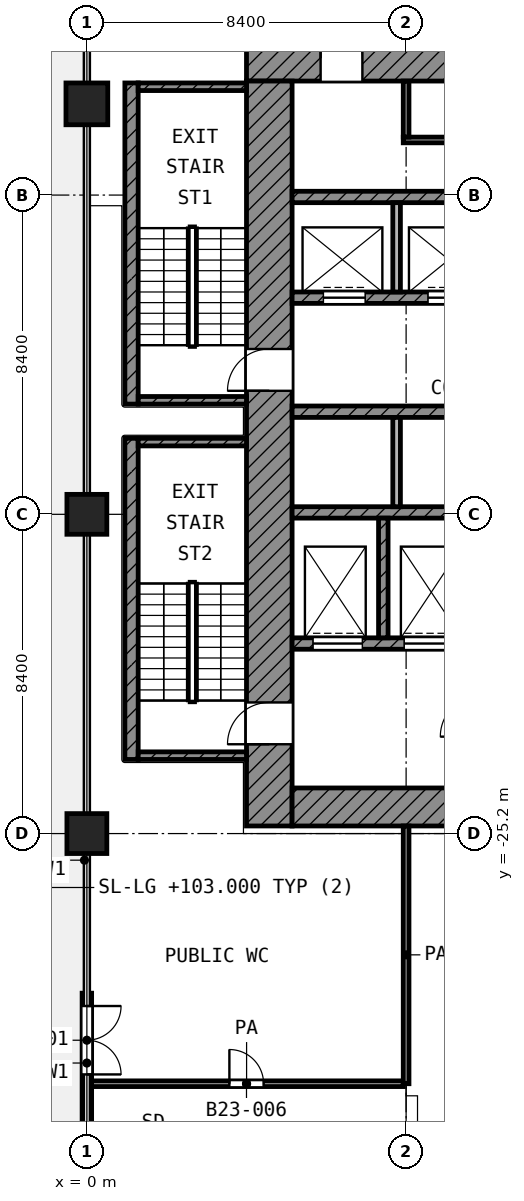
"""IFC4 building model, lengths in metres.
Left out: names, types, materials, properties, quantities, classifications, styles, units other than length and angle.
Written with IfcOpenShell. Run it as: python <this file> out.ifc"""

import sys

from ifc_helpers import new_model, si_unit, direction, frame, frame_2d, origin, origin_2d, place, context, subcontext, project, spatial, rectangle, extrude, element, fill, save


model = new_model("IFC4")
c1 = context("Model", 3, precision=1e-05, world=origin(), true_north=direction((0.0, 1.0)))
c2 = subcontext(c1, "Body", "Model", "MODEL_VIEW")
j1 = project(units=[si_unit("LENGTHUNIT", "METRE"), si_unit("PLANEANGLEUNIT", "RADIAN")], contexts=[c1])
p1 = place(None, origin())
s1 = spatial("IfcSite", under=j1, at=p1, CompositionType="ELEMENT")
p2 = place(p1, origin())
s2 = spatial("IfcBuilding", under=s1, at=p2, CompositionType="ELEMENT")
p3 = place(p2, frame((0.0, 0.0, 103.0)))
s3 = spatial("IfcBuildingStorey", under=s2, at=p3, CompositionType="ELEMENT", Elevation=103.0)
p4 = place(p3, frame((0.0, -6.0, 0.0), z_axis=(0.0, 0.0, 1.0), x_axis=(1.0, 0.0, 0.0)))
e1 = element("IfcColumn", 1, at=p4, inside=s3, PredefinedType="COLUMN", context=c2, shape_type="SweptSolid", body=[
    extrude(rectangle(XDim=1.1, YDim=1.1, at=origin_2d()), origin(), (0.0, 0.0, 1.0), 4.2),
])
for number, where, z_axis, x_axis in (
    (2, (0.0, -16.8, 0.0), (0.0, 0.0, 1.0), (1.0, 0.0, 0.0)),
    (3, (0.0, -25.2, 0.0), (0.0, 0.0, 1.0), (1.0, 0.0, 0.0)),
):
    element("IfcColumn", number, at=place(p3, frame(where, z_axis=z_axis, x_axis=x_axis)), inside=s3, PredefinedType="COLUMN", context=c2, shape_type="SweptSolid", body=[
        extrude(rectangle(XDim=1.05, YDim=1.05, at=origin_2d()), origin(), (0.0, 0.0, 1.0), 4.2),
    ])
p5 = place(p3, frame((0.0, -29.4, 0.0), z_axis=(0.0, 0.0, 1.0), x_axis=(0.0, -1.0, 0.0)))
e4 = element("IfcWall", 4, at=p5, inside=s3, PredefinedType="SOLIDWALL", context=c2, shape_type="SweptSolid", body=[
    extrude(rectangle(XDim=3.675, YDim=0.25, at=frame_2d((1.837, 0.0))), origin(), (0.0, 0.0, 1.0), 3.48),
])
p6 = place(p5, frame((0.337, 0.0, 0.0)))
e5 = element("IfcOpeningElement", 5, at=p6, cuts=e4, PredefinedType="OPENING", context=c2, shape_type="SweptSolid", body=[
    extrude(rectangle(XDim=1.8, YDim=2.1, at=frame_2d((0.9, 1.05))), frame((0.0, 0.135, 0.0), z_axis=(0.0, -1.0, 0.0), x_axis=(1.0, 0.0, 0.0)), (0.0, 0.0, 1.0), 0.27),
])
p7 = place(p3, frame((4.2, -4.8, 0.0), z_axis=(0.0, 0.0, 1.0), x_axis=(1.0, 0.0, 0.0)))
e6 = element("IfcWall", 6, at=p7, inside=s3, PredefinedType="SHEAR", context=c2, shape_type="SweptSolid", body=[
    extrude(rectangle(XDim=20.8, YDim=1.2, at=frame_2d((10.4, 0.0))), origin(), (0.0, 0.0, 1.0), 3.6),
])
p8 = place(p7, frame((1.95, 0.0, 0.0)))
e7 = element("IfcOpeningElement", 7, at=p8, cuts=e6, PredefinedType="OPENING", context=c2, shape_type="SweptSolid", body=[
    extrude(rectangle(XDim=1.1, YDim=2.1, at=frame_2d((0.55, 1.05))), frame((0.0, 0.61, 0.0), z_axis=(0.0, -1.0, 0.0), x_axis=(1.0, 0.0, 0.0)), (0.0, 0.0, 1.0), 1.22),
])
p9 = place(p7, frame((17.95, 0.0, 0.0)))
e8 = element("IfcOpeningElement", 8, at=p9, cuts=e6, PredefinedType="OPENING", context=c2, shape_type="SweptSolid", body=[
    extrude(rectangle(XDim=1.1, YDim=2.1, at=frame_2d((0.55, 1.05))), frame((0.0, 0.61, 0.0), z_axis=(0.0, -1.0, 0.0), x_axis=(1.0, 0.0, 0.0)), (0.0, 0.0, 1.0), 1.22),
])
p10 = place(p3, frame((4.8, -25.0, 0.0), z_axis=(0.0, 0.0, 1.0), x_axis=(0.0, 1.0, 0.0)))
e9 = element("IfcWall", 9, at=p10, inside=s3, PredefinedType="SHEAR", context=c2, shape_type="SweptSolid", body=[
    extrude(rectangle(XDim=19.6, YDim=1.2, at=frame_2d((9.8, 0.0))), origin(), (0.0, 0.0, 1.0), 3.6),
])
p11 = place(p10, frame((11.45, 0.0, 0.0)))
e10 = element("IfcOpeningElement", 10, at=p11, cuts=e9, PredefinedType="OPENING", context=c2, shape_type="SweptSolid", body=[
    extrude(rectangle(XDim=1.1, YDim=2.1, at=frame_2d((0.55, 1.05))), frame((0.0, 0.61, 0.0), z_axis=(0.0, -1.0, 0.0), x_axis=(1.0, 0.0, 0.0)), (0.0, 0.0, 1.0), 1.22),
])
p12 = place(p10, frame((2.15, 0.0, 0.0)))
e11 = element("IfcOpeningElement", 11, at=p12, cuts=e9, PredefinedType="OPENING", context=c2, shape_type="SweptSolid", body=[
    extrude(rectangle(XDim=1.1, YDim=2.1, at=frame_2d((0.55, 1.05))), frame((0.0, 0.61, 0.0), z_axis=(0.0, -1.0, 0.0), x_axis=(1.0, 0.0, 0.0)), (0.0, 0.0, 1.0), 1.22),
])
p13 = place(p3, frame((5.4, -24.5, 0.0), z_axis=(0.0, 0.0, 1.0), x_axis=(1.0, 0.0, 0.0)))
e12 = element("IfcWall", 12, at=p13, inside=s3, PredefinedType="SHEAR", context=c2, shape_type="SweptSolid", body=[
    extrude(rectangle(XDim=18.6, YDim=1.0, at=frame_2d((9.3, 0.0))), origin(), (0.0, 0.0, 1.0), 3.6),
])
p14 = place(p13, frame((6.3, 0.0, 0.0)))
e13 = element("IfcOpeningElement", 13, at=p14, cuts=e12, PredefinedType="OPENING", context=c2, shape_type="SweptSolid", body=[
    extrude(rectangle(XDim=1.8, YDim=2.1, at=frame_2d((0.9, 1.05))), frame((0.0, 0.51, 0.0), z_axis=(0.0, -1.0, 0.0), x_axis=(1.0, 0.0, 0.0)), (0.0, 0.0, 1.0), 1.02),
])
p15 = place(p3, frame((5.4, -8.45, 0.0), z_axis=(0.0, 0.0, 1.0), x_axis=(1.0, 0.0, 0.0)))
e14 = element("IfcWall", 14, at=p15, inside=s3, PredefinedType="SHEAR", context=c2, shape_type="SweptSolid", body=[
    extrude(rectangle(XDim=16.65, YDim=0.3, at=frame_2d((8.325, 0.0))), origin(), (0.0, 0.0, 1.0), 3.6),
])
p16 = place(p3, frame((5.4, -11.1, 0.0), z_axis=(0.0, 0.0, 1.0), x_axis=(1.0, 0.0, 0.0)))
e15 = element("IfcWall", 15, at=p16, inside=s3, PredefinedType="SHEAR", context=c2, shape_type="SweptSolid", body=[
    extrude(rectangle(XDim=16.65, YDim=0.3, at=frame_2d((8.325, 0.0))), origin(), (0.0, 0.0, 1.0), 3.6),
])
p17 = place(p16, frame((0.825, 0.0, 0.0)))
e16 = element("IfcOpeningElement", 16, at=p17, cuts=e15, PredefinedType="OPENING", context=c2, shape_type="SweptSolid", body=[
    extrude(rectangle(XDim=1.1, YDim=2.1, at=frame_2d((0.55, 1.05))), frame((0.0, 0.16, 0.0), z_axis=(0.0, -1.0, 0.0), x_axis=(1.0, 0.0, 0.0)), (0.0, 0.0, 1.0), 0.32),
])
p18 = place(p16, frame((3.575, 0.0, 0.0)))
e17 = element("IfcOpeningElement", 17, at=p18, cuts=e15, PredefinedType="OPENING", context=c2, shape_type="SweptSolid", body=[
    extrude(rectangle(XDim=1.1, YDim=2.1, at=frame_2d((0.55, 1.05))), frame((0.0, 0.16, 0.0), z_axis=(0.0, -1.0, 0.0), x_axis=(1.0, 0.0, 0.0)), (0.0, 0.0, 1.0), 0.32),
])
p19 = place(p16, frame((6.325, 0.0, 0.0)))
e18 = element("IfcOpeningElement", 18, at=p19, cuts=e15, PredefinedType="OPENING", context=c2, shape_type="SweptSolid", body=[
    extrude(rectangle(XDim=1.1, YDim=2.1, at=frame_2d((0.55, 1.05))), frame((0.0, 0.16, 0.0), z_axis=(0.0, -1.0, 0.0), x_axis=(1.0, 0.0, 0.0)), (0.0, 0.0, 1.0), 0.32),
])
p20 = place(p16, frame((9.075, 0.0, 0.0)))
e19 = element("IfcOpeningElement", 19, at=p20, cuts=e15, PredefinedType="OPENING", context=c2, shape_type="SweptSolid", body=[
    extrude(rectangle(XDim=1.1, YDim=2.1, at=frame_2d((0.55, 1.05))), frame((0.0, 0.16, 0.0), z_axis=(0.0, -1.0, 0.0), x_axis=(1.0, 0.0, 0.0)), (0.0, 0.0, 1.0), 0.32),
])
for number, where, z_axis, x_axis in (
    (20, (5.4, -14.1, 0.0), (0.0, 0.0, 1.0), (1.0, 0.0, 0.0)),
    (21, (5.4, -16.75, 0.0), (0.0, 0.0, 1.0), (1.0, 0.0, 0.0)),
):
    element("IfcWall", number, at=place(p3, frame(where, z_axis=z_axis, x_axis=x_axis)), inside=s3, PredefinedType="SHEAR", context=c2, shape_type="SweptSolid", body=[
        extrude(rectangle(XDim=16.65, YDim=0.3, at=frame_2d((8.325, 0.0))), origin(), (0.0, 0.0, 1.0), 3.6),
    ])
p21 = place(p3, frame((5.4, -20.2, 0.0), z_axis=(0.0, 0.0, 1.0), x_axis=(1.0, 0.0, 0.0)))
e22 = element("IfcWall", 22, at=p21, inside=s3, PredefinedType="SHEAR", context=c2, shape_type="SweptSolid", body=[
    extrude(rectangle(XDim=14.65, YDim=0.3, at=frame_2d((7.325, 0.0))), origin(), (0.0, 0.0, 1.0), 3.6),
])
p22 = place(p21, frame((10.55, 0.0, 0.0)))
e23 = element("IfcOpeningElement", 23, at=p22, cuts=e22, PredefinedType="OPENING", context=c2, shape_type="SweptSolid", body=[
    extrude(rectangle(XDim=1.3, YDim=2.1, at=frame_2d((0.65, 1.05))), frame((0.0, 0.16, 0.0), z_axis=(0.0, -1.0, 0.0), x_axis=(1.0, 0.0, 0.0)), (0.0, 0.0, 1.0), 0.32),
])
p23 = place(p21, frame((12.95, 0.0, 0.0)))
e24 = element("IfcOpeningElement", 24, at=p23, cuts=e22, PredefinedType="OPENING", context=c2, shape_type="SweptSolid", body=[
    extrude(rectangle(XDim=1.3, YDim=2.1, at=frame_2d((0.65, 1.05))), frame((0.0, 0.16, 0.0), z_axis=(0.0, -1.0, 0.0), x_axis=(1.0, 0.0, 0.0)), (0.0, 0.0, 1.0), 0.32),
])
p24 = place(p21, frame((0.55, 0.0, 0.0)))
e25 = element("IfcOpeningElement", 25, at=p24, cuts=e22, PredefinedType="OPENING", context=c2, shape_type="SweptSolid", body=[
    extrude(rectangle(XDim=1.3, YDim=2.1, at=frame_2d((0.65, 1.05))), frame((0.0, 0.16, 0.0), z_axis=(0.0, -1.0, 0.0), x_axis=(1.0, 0.0, 0.0)), (0.0, 0.0, 1.0), 0.32),
])
p25 = place(p21, frame((2.95, 0.0, 0.0)))
e26 = element("IfcOpeningElement", 26, at=p25, cuts=e22, PredefinedType="OPENING", context=c2, shape_type="SweptSolid", body=[
    extrude(rectangle(XDim=1.3, YDim=2.1, at=frame_2d((0.65, 1.05))), frame((0.0, 0.16, 0.0), z_axis=(0.0, -1.0, 0.0), x_axis=(1.0, 0.0, 0.0)), (0.0, 0.0, 1.0), 0.32),
])
p26 = place(p21, frame((7.15, 0.0, 0.0)))
e27 = element("IfcOpeningElement", 27, at=p26, cuts=e22, PredefinedType="OPENING", context=c2, shape_type="SweptSolid", body=[
    extrude(rectangle(XDim=0.9, YDim=2.1, at=frame_2d((0.45, 1.05))), frame((0.0, 0.16, 0.0), z_axis=(0.0, -1.0, 0.0), x_axis=(1.0, 0.0, 0.0)), (0.0, 0.0, 1.0), 0.32),
])
p27 = place(p3, frame((7.8, -20.05, 0.0), z_axis=(0.0, 0.0, 1.0), x_axis=(0.0, 1.0, 0.0)))
e28 = element("IfcWall", 28, at=p27, inside=s3, PredefinedType="SHEAR", context=c2, shape_type="SweptSolid", body=[
    extrude(rectangle(XDim=3.15, YDim=0.25, at=frame_2d((1.575, 0.0))), origin(), (0.0, 0.0, 1.0), 3.6),
])
p28 = place(p3, frame((8.15, -10.95, 0.0), z_axis=(0.0, 0.0, 1.0), x_axis=(0.0, 1.0, 0.0)))
e29 = element("IfcWall", 29, at=p28, inside=s3, PredefinedType="PARTITIONING", context=c2, shape_type="SweptSolid", body=[
    extrude(rectangle(XDim=2.35, YDim=0.2, at=frame_2d((1.175, 0.0))), origin(), (0.0, 0.0, 1.0), 3.6),
])
p29 = place(p3, frame((8.15, -16.6, 0.0), z_axis=(0.0, 0.0, 1.0), x_axis=(0.0, 1.0, 0.0)))
e30 = element("IfcWall", 30, at=p29, inside=s3, PredefinedType="PARTITIONING", context=c2, shape_type="SweptSolid", body=[
    extrude(rectangle(XDim=2.35, YDim=0.2, at=frame_2d((1.175, 0.0))), origin(), (0.0, 0.0, 1.0), 3.6),
])
p30 = place(p3, frame((8.325, -6.95, 0.0), z_axis=(0.0, 0.0, 1.0), x_axis=(1.0, 0.0, 0.0)))
e31 = element("IfcWall", 31, at=p30, inside=s3, PredefinedType="PARTITIONING", context=c2, shape_type="SweptSolid", body=[
    extrude(rectangle(XDim=12.75, YDim=0.15, at=frame_2d((6.375, 0.0))), origin(), (0.0, 0.0, 1.0), 3.6),
])
p31 = place(p30, frame((1.725, 0.0, 0.0)))
e32 = element("IfcOpeningElement", 32, at=p31, cuts=e31, PredefinedType="OPENING", context=c2, shape_type="SweptSolid", body=[
    extrude(rectangle(XDim=0.9, YDim=2.1, at=frame_2d((0.45, 1.05))), frame((0.0, 0.085, 0.0), z_axis=(0.0, -1.0, 0.0), x_axis=(1.0, 0.0, 0.0)), (0.0, 0.0, 1.0), 0.17),
])
p32 = place(p30, frame((5.925, 0.0, 0.0)))
e33 = element("IfcOpeningElement", 33, at=p32, cuts=e31, PredefinedType="OPENING", context=c2, shape_type="SweptSolid", body=[
    extrude(rectangle(XDim=0.9, YDim=2.1, at=frame_2d((0.45, 1.05))), frame((0.0, 0.085, 0.0), z_axis=(0.0, -1.0, 0.0), x_axis=(1.0, 0.0, 0.0)), (0.0, 0.0, 1.0), 0.17),
])
p33 = place(p30, frame((10.125, 0.0, 0.0)))
e34 = element("IfcOpeningElement", 34, at=p33, cuts=e31, PredefinedType="OPENING", context=c2, shape_type="SweptSolid", body=[
    extrude(rectangle(XDim=0.9, YDim=2.1, at=frame_2d((0.45, 1.05))), frame((0.0, 0.085, 0.0), z_axis=(0.0, -1.0, 0.0), x_axis=(1.0, 0.0, 0.0)), (0.0, 0.0, 1.0), 0.17),
])
p34 = place(p3, frame((8.4, -6.875, 0.0), z_axis=(0.0, 0.0, 1.0), x_axis=(0.0, 1.0, 0.0)))
e35 = element("IfcWall", 35, at=p34, inside=s3, PredefinedType="PARTITIONING", context=c2, shape_type="SweptSolid", body=[
    extrude(rectangle(XDim=1.475, YDim=0.15, at=frame_2d((0.738, 0.0))), origin(), (0.0, 0.0, 1.0), 3.6),
])
p35 = place(p3, frame((1.175, -13.9, 0.0), z_axis=(0.0, 0.0, 1.0), x_axis=(0.0, 1.0, 0.0)))
e36 = element("IfcWall", 36, at=p35, inside=s3, PredefinedType="SHEAR", context=c2, shape_type="SweptSolid", body=[
    extrude(rectangle(XDim=8.45, YDim=0.35, at=frame_2d((4.225, 0.0))), origin(), (0.0, 0.0, 1.0), 3.6),
])
for number, where, z_axis, x_axis in (
    (37, (1.35, -5.55, 0.0), (0.0, 0.0, 1.0), (1.0, 0.0, 0.0)),
    (38, (1.35, -13.8, 0.0), (0.0, 0.0, 1.0), (1.0, 0.0, 0.0)),
):
    element("IfcWall", number, at=place(p3, frame(where, z_axis=z_axis, x_axis=x_axis)), inside=s3, PredefinedType="SHEAR", context=c2, shape_type="SweptSolid", body=[
        extrude(rectangle(XDim=2.85, YDim=0.2, at=frame_2d((1.425, 0.0))), origin(), (0.0, 0.0, 1.0), 3.6),
    ])
p36 = place(p3, frame((1.175, -23.25, 0.0), z_axis=(0.0, 0.0, 1.0), x_axis=(0.0, 1.0, 0.0)))
e39 = element("IfcWall", 39, at=p36, inside=s3, PredefinedType="SHEAR", context=c2, shape_type="SweptSolid", body=[
    extrude(rectangle(XDim=8.45, YDim=0.35, at=frame_2d((4.225, 0.0))), origin(), (0.0, 0.0, 1.0), 3.6),
])
for number, where, z_axis, x_axis in (
    (40, (1.35, -14.9, 0.0), (0.0, 0.0, 1.0), (1.0, 0.0, 0.0)),
    (41, (1.35, -23.15, 0.0), (0.0, 0.0, 1.0), (1.0, 0.0, 0.0)),
):
    element("IfcWall", number, at=place(p3, frame(where, z_axis=z_axis, x_axis=x_axis)), inside=s3, PredefinedType="SHEAR", context=c2, shape_type="SweptSolid", body=[
        extrude(rectangle(XDim=2.85, YDim=0.2, at=frame_2d((1.425, 0.0))), origin(), (0.0, 0.0, 1.0), 3.6),
    ])
p37 = place(p3, frame((0.08, -31.782, 0.0), z_axis=(0.0, 0.0, 1.0), x_axis=(1.0, 0.0, 0.0)))
e42 = element("IfcWall", 42, at=p37, inside=s3, PredefinedType="PARTITIONING", context=c2, shape_type="SweptSolid", body=[
    extrude(rectangle(XDim=8.245, YDim=0.15, at=frame_2d((4.123, 0.0))), origin(), (0.0, 0.0, 1.0), 3.6),
])
p38 = place(p37, frame((3.67, 0.0, 0.0)))
e43 = element("IfcOpeningElement", 43, at=p38, cuts=e42, PredefinedType="OPENING", context=c2, shape_type="SweptSolid", body=[
    extrude(rectangle(XDim=0.9, YDim=2.1, at=frame_2d((0.45, 1.05))), frame((0.0, 0.085, 0.0), z_axis=(0.0, -1.0, 0.0), x_axis=(1.0, 0.0, 0.0)), (0.0, 0.0, 1.0), 0.17),
])
p39 = place(p3, frame((8.4, -31.782, 0.0), z_axis=(0.0, 0.0, 1.0), x_axis=(0.0, 1.0, 0.0)))
e44 = element("IfcWall", 44, at=p39, inside=s3, PredefinedType="PARTITIONING", context=c2, shape_type="SweptSolid", body=[
    extrude(rectangle(XDim=6.782, YDim=0.15, at=frame_2d((3.391, 0.0))), origin(), (0.0, 0.0, 1.0), 3.6),
])
p40 = place(p6, origin())
e45 = element("IfcDoor", 45, at=p40, inside=s3, OperationType="DOUBLE_DOOR_SINGLE_SWING", PredefinedType="DOOR", context=c2, shape_type="SweptSolid", body=[
    extrude(rectangle(XDim=1.8, YDim=2.1, at=frame_2d((0.9, 1.05))), frame((0.0, 0.025, 0.0), z_axis=(0.0, -1.0, 0.0), x_axis=(1.0, 0.0, 0.0)), (0.0, 0.0, 1.0), 0.05),
])
fill(e5, e45)
p41 = place(p17, origin())
e46 = element("IfcDoor", 46, at=p41, inside=s3, OperationType="DOUBLE_DOOR_SLIDING", PredefinedType="DOOR", context=c2, shape_type="SweptSolid", body=[
    extrude(rectangle(XDim=1.1, YDim=2.1, at=frame_2d((0.55, 1.05))), frame((0.0, 0.025, 0.0), z_axis=(0.0, -1.0, 0.0), x_axis=(1.0, 0.0, 0.0)), (0.0, 0.0, 1.0), 0.05),
])
fill(e16, e46)
p42 = place(p18, origin())
e47 = element("IfcDoor", 47, at=p42, inside=s3, OperationType="DOUBLE_DOOR_SLIDING", PredefinedType="DOOR", context=c2, shape_type="SweptSolid", body=[
    extrude(rectangle(XDim=1.1, YDim=2.1, at=frame_2d((0.55, 1.05))), frame((0.0, 0.025, 0.0), z_axis=(0.0, -1.0, 0.0), x_axis=(1.0, 0.0, 0.0)), (0.0, 0.0, 1.0), 0.05),
])
fill(e17, e47)
p43 = place(p24, origin())
e48 = element("IfcDoor", 48, at=p43, inside=s3, OperationType="DOUBLE_DOOR_SLIDING", PredefinedType="DOOR", context=c2, shape_type="SweptSolid", body=[
    extrude(rectangle(XDim=1.3, YDim=2.1, at=frame_2d((0.65, 1.05))), frame((0.0, 0.025, 0.0), z_axis=(0.0, -1.0, 0.0), x_axis=(1.0, 0.0, 0.0)), (0.0, 0.0, 1.0), 0.05),
])
fill(e25, e48)
p44 = place(p25, origin())
e49 = element("IfcDoor", 49, at=p44, inside=s3, OperationType="DOUBLE_DOOR_SLIDING", PredefinedType="DOOR", context=c2, shape_type="SweptSolid", body=[
    extrude(rectangle(XDim=1.3, YDim=2.1, at=frame_2d((0.65, 1.05))), frame((0.0, 0.025, 0.0), z_axis=(0.0, -1.0, 0.0), x_axis=(1.0, 0.0, 0.0)), (0.0, 0.0, 1.0), 0.05),
])
fill(e26, e49)
p45 = place(p11, origin())
e50 = element("IfcDoor", 50, at=p45, inside=s3, OperationType="SINGLE_SWING_LEFT", PredefinedType="DOOR", context=c2, shape_type="SweptSolid", body=[
    extrude(rectangle(XDim=1.1, YDim=2.1, at=frame_2d((0.55, 1.05))), frame((0.0, 0.025, 0.0), z_axis=(0.0, -1.0, 0.0), x_axis=(1.0, 0.0, 0.0)), (0.0, 0.0, 1.0), 0.05),
])
fill(e10, e50)
p46 = place(p12, origin())
e51 = element("IfcDoor", 51, at=p46, inside=s3, OperationType="SINGLE_SWING_LEFT", PredefinedType="DOOR", context=c2, shape_type="SweptSolid", body=[
    extrude(rectangle(XDim=1.1, YDim=2.1, at=frame_2d((0.55, 1.05))), frame((0.0, 0.025, 0.0), z_axis=(0.0, -1.0, 0.0), x_axis=(1.0, 0.0, 0.0)), (0.0, 0.0, 1.0), 0.05),
])
fill(e11, e51)
p47 = place(p8, origin())
e52 = element("IfcDoor", 52, at=p47, inside=s3, OperationType="SINGLE_SWING_LEFT", PredefinedType="DOOR", context=c2, shape_type="SweptSolid", body=[
    extrude(rectangle(XDim=1.1, YDim=2.1, at=frame_2d((0.55, 1.05))), frame((0.0, 0.025, 0.0), z_axis=(0.0, -1.0, 0.0), x_axis=(1.0, 0.0, 0.0)), (0.0, 0.0, 1.0), 0.05),
])
fill(e7, e52)
p48 = place(p38, origin())
e53 = element("IfcDoor", 53, at=p48, inside=s3, OperationType="SINGLE_SWING_LEFT", PredefinedType="DOOR", context=c2, shape_type="SweptSolid", body=[
    extrude(rectangle(XDim=0.9, YDim=2.1, at=frame_2d((0.45, 1.05))), frame((0.0, 0.025, 0.0), z_axis=(0.0, -1.0, 0.0), x_axis=(1.0, 0.0, 0.0)), (0.0, 0.0, 1.0), 0.05),
])
fill(e43, e53)
save(model, sys.argv[1])
